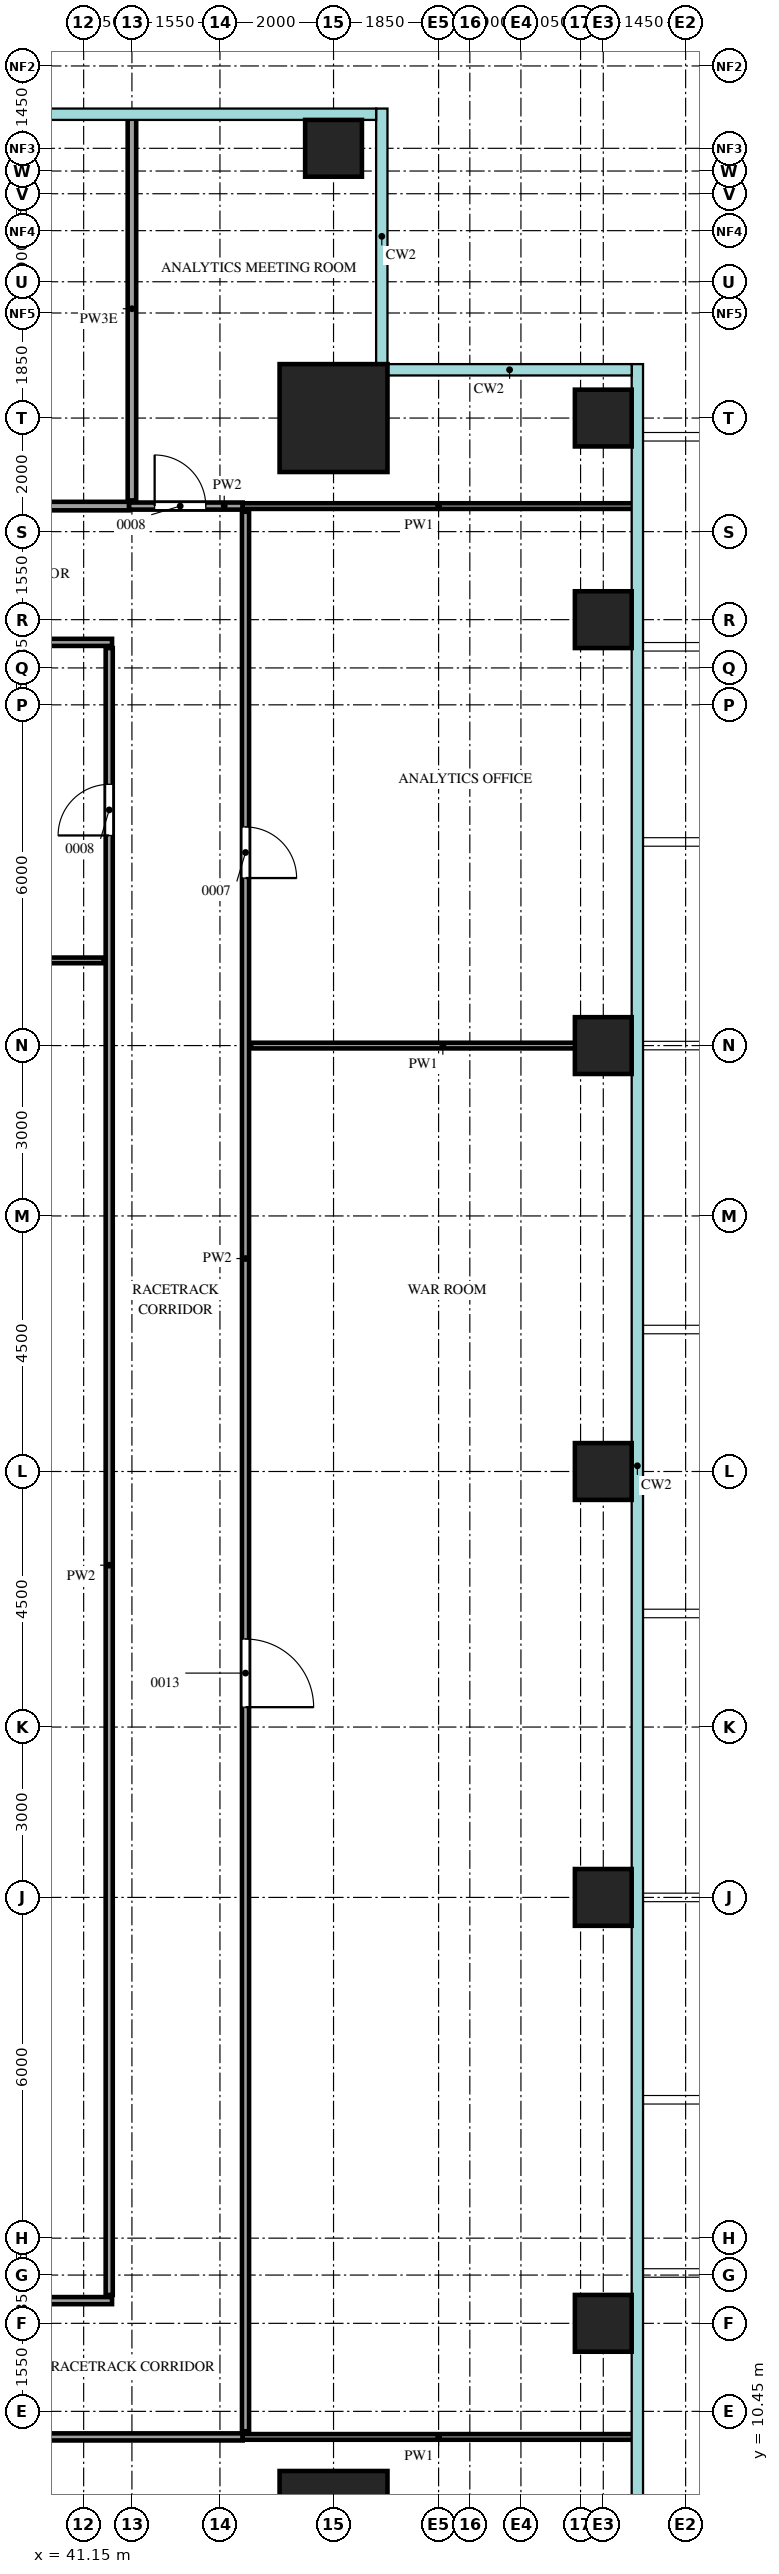
"""IFC4 building model, lengths in metres.
Left out: names, types, materials, properties, quantities, classifications, styles, units other than length and angle.
Written with IfcOpenShell. Run it as: python <this file> out.ifc"""

import sys

from ifc_helpers import new_model, si_unit, direction, frame, frame_2d, origin, origin_2d, place, context, subcontext, project, spatial, rectangle, extrude, source, transform, mapped, element, fill, save


model = new_model("IFC4")
c1 = context("Model", 3, precision=1e-05, world=origin(), true_north=direction((0.0, 1.0)))
c2 = subcontext(c1, "Body", "Model", "MODEL_VIEW")
j1 = project(units=[si_unit("LENGTHUNIT", "METRE"), si_unit("PLANEANGLEUNIT", "RADIAN")], contexts=[c1])
p1 = place(None, origin())
s1 = spatial("IfcSite", under=j1, at=p1, CompositionType="ELEMENT")
p2 = place(p1, origin())
s2 = spatial("IfcBuilding", under=s1, at=p2, CompositionType="ELEMENT")
p3 = place(p2, frame((0.0, 0.0, 208.7)))
s3 = spatial("IfcBuildingStorey", under=s2, at=p3, CompositionType="ELEMENT", Elevation=208.7)
m1 = source(origin(), c2, "Body", "SweptSolid", [
    extrude(rectangle(XDim=1.9, YDim=1.9, at=origin_2d()), origin(), (0.0, 0.0, 1.0), 4.0),
])
for number, where, z_axis, x_axis in (
    (1, (45.55, 45.55, 0.0), (0.0, 0.0, 1.0), (1.0, 0.0, 0.0)),
    (2, (45.55, 8.45, 0.0), (0.0, 0.0, 1.0), (1.0, 0.0, 0.0)),
):
    element("IfcColumn", number, at=place(p3, frame(where, z_axis=z_axis, x_axis=x_axis)), inside=s3, PredefinedType="COLUMN", context=c2, shape_type="MappedRepresentation", body=[
        mapped(m1, transform((0.0, 0.0, 0.0))),
    ])
m2 = source(origin(), c2, "Body", "SweptSolid", [
    extrude(rectangle(XDim=1.0, YDim=1.0, at=origin_2d()), origin(), (0.0, 0.0, 1.0), 3.75),
])
for number, where, z_axis, x_axis in (
    (3, (50.3, 12.0, 0.0), (0.0, 0.0, 1.0), (1.0, 0.0, 0.0)),
    (4, (50.3, 19.5, 0.0), (0.0, 0.0, 1.0), (1.0, 0.0, 0.0)),
    (5, (50.3, 27.0, 0.0), (0.0, 0.0, 1.0), (1.0, 0.0, 0.0)),
    (6, (50.3, 34.5, 0.0), (0.0, 0.0, 1.0), (1.0, 0.0, 0.0)),
    (7, (50.3, 42.0, 0.0), (0.0, 0.0, 1.0), (1.0, 0.0, 0.0)),
    (8, (50.3, 45.55, 0.0), (0.0, 0.0, 1.0), (1.0, 0.0, 0.0)),
    (9, (45.55, 50.3, 0.0), (0.0, 0.0, 1.0), (1.0, 0.0, 0.0)),
):
    element("IfcColumn", number, at=place(p3, frame(where, z_axis=z_axis, x_axis=x_axis)), inside=s3, PredefinedType="COLUMN", context=c2, shape_type="MappedRepresentation", body=[
        mapped(m2, transform((0.0, 0.0, 0.0))),
    ])
m3 = source(origin(), c2, "Body", "SweptSolid", [
    extrude(rectangle(XDim=20.6, YDim=0.125, at=frame_2d((10.3, 0.0))), origin(), (0.0, 0.0, 1.0), 3.8),
])
p4 = place(p3, frame((23.35, 10.0, 0.0), z_axis=(0.0, 0.0, 1.0), x_axis=(1.0, 0.0, 0.0)))
e10 = element("IfcWall", 10, at=p4, inside=s3, PredefinedType="PARTITIONING", context=c2, shape_type="MappedRepresentation", body=[
    mapped(m3, transform((0.0, 0.0, 0.0))),
])
m4 = source(origin(), c2, "Body", "SweptSolid", [
    extrude(rectangle(XDim=0.9, YDim=2.1, at=frame_2d((0.45, 1.05))), frame((0.0, 0.073, 0.0), z_axis=(0.0, -1.0, 0.0), x_axis=(1.0, 0.0, 0.0)), (0.0, 0.0, 1.0), 0.145),
])
p5 = place(p4, frame((1.25, 0.0, 0.0)))
e11 = element("IfcOpeningElement", 11, at=p5, cuts=e10, PredefinedType="OPENING", context=c2, shape_type="MappedRepresentation", body=[
    mapped(m4, transform((0.0, 0.0, 0.0))),
])
m5 = source(origin(), c2, "Body", "SweptSolid", [
    extrude(rectangle(XDim=1.2, YDim=2.1, at=frame_2d((0.6, 1.05))), frame((0.0, 0.073, 0.0), z_axis=(0.0, -1.0, 0.0), x_axis=(1.0, 0.0, 0.0)), (0.0, 0.0, 1.0), 0.145),
])
p6 = place(p4, frame((11.55, 0.0, 0.0)))
e12 = element("IfcOpeningElement", 12, at=p6, cuts=e10, PredefinedType="OPENING", context=c2, shape_type="MappedRepresentation", body=[
    mapped(m5, transform((0.0, 0.0, 0.0))),
])
m6 = source(origin(), c2, "Body", "SweptSolid", [
    extrude(rectangle(XDim=6.9, YDim=0.1, at=frame_2d((3.45, 0.0))), origin(), (0.0, 0.0, 1.0), 3.8),
])
p7 = place(p3, frame((43.95, 10.0, 0.0), z_axis=(0.0, 0.0, 1.0), x_axis=(1.0, 0.0, 0.0)))
e13 = element("IfcWall", 13, at=p7, inside=s3, PredefinedType="PARTITIONING", context=c2, shape_type="MappedRepresentation", body=[
    mapped(m6, transform((0.0, 0.0, 0.0))),
])
m7 = source(origin(), c2, "Body", "SweptSolid", [
    extrude(rectangle(XDim=33.8, YDim=0.125, at=frame_2d((16.9, 0.0))), origin(), (0.0, 0.0, 1.0), 3.8),
])
p8 = place(p3, frame((44.0, 10.1, 0.0), z_axis=(0.0, 0.0, 1.0), x_axis=(0.0, 1.0, 0.0)))
e14 = element("IfcWall", 14, at=p8, inside=s3, PredefinedType="PARTITIONING", context=c2, shape_type="MappedRepresentation", body=[
    mapped(m7, transform((0.0, 0.0, 0.0))),
])
p9 = place(p8, frame((12.75, 0.0, 0.0)))
e15 = element("IfcOpeningElement", 15, at=p9, cuts=e14, PredefinedType="OPENING", context=c2, shape_type="MappedRepresentation", body=[
    mapped(m5, transform((0.0, 0.0, 0.0))),
])
p10 = place(p8, frame((27.35, 0.0, 0.0)))
e16 = element("IfcOpeningElement", 16, at=p10, cuts=e14, PredefinedType="OPENING", context=c2, shape_type="MappedRepresentation", body=[
    mapped(m4, transform((0.0, 0.0, 0.0))),
])
m8 = source(origin(), c2, "Body", "SweptSolid", [
    extrude(rectangle(XDim=18.3, YDim=0.125, at=frame_2d((9.15, 0.0))), origin(), (0.0, 0.0, 1.0), 3.8),
])
p11 = place(p3, frame((23.35, 12.4, 0.0), z_axis=(0.0, 0.0, 1.0), x_axis=(1.0, 0.0, 0.0)))
e17 = element("IfcWall", 17, at=p11, inside=s3, PredefinedType="PARTITIONING", context=c2, shape_type="MappedRepresentation", body=[
    mapped(m8, transform((0.0, 0.0, 0.0))),
])
m9 = source(origin(), c2, "Body", "SweptSolid", [
    extrude(rectangle(XDim=29.0, YDim=0.125, at=frame_2d((14.5, 0.0))), origin(), (0.0, 0.0, 1.0), 3.8),
])
p12 = place(p3, frame((41.6, 12.5, 0.0), z_axis=(0.0, 0.0, 1.0), x_axis=(0.0, 1.0, 0.0)))
e18 = element("IfcWall", 18, at=p12, inside=s3, PredefinedType="PARTITIONING", context=c2, shape_type="MappedRepresentation", body=[
    mapped(m9, transform((0.0, 0.0, 0.0))),
])
p13 = place(p12, frame((25.7, 0.0, 0.0)))
e19 = element("IfcOpeningElement", 19, at=p13, cuts=e18, PredefinedType="OPENING", context=c2, shape_type="MappedRepresentation", body=[
    mapped(m4, transform((0.0, 0.0, 0.0))),
])
m10 = source(origin(), c2, "Body", "SweptSolid", [
    extrude(rectangle(XDim=6.75, YDim=0.1, at=frame_2d((3.375, 0.0))), origin(), (0.0, 0.0, 1.0), 3.8),
])
p14 = place(p3, frame((44.1, 34.5, 0.0), z_axis=(0.0, 0.0, 1.0), x_axis=(1.0, 0.0, 0.0)))
e20 = element("IfcWall", 20, at=p14, inside=s3, PredefinedType="PARTITIONING", context=c2, shape_type="MappedRepresentation", body=[
    mapped(m10, transform((0.0, 0.0, 0.0))),
])
m11 = source(origin(), c2, "Body", "SweptSolid", [
    extrude(rectangle(XDim=10.95, YDim=0.1, at=frame_2d((5.475, 0.0))), origin(), (0.0, 0.0, 1.0), 3.8),
])
p15 = place(p3, frame((30.55, 36.0, 0.0), z_axis=(0.0, 0.0, 1.0), x_axis=(1.0, 0.0, 0.0)))
e21 = element("IfcWall", 21, at=p15, inside=s3, PredefinedType="PARTITIONING", context=c2, shape_type="MappedRepresentation", body=[
    mapped(m11, transform((0.0, 0.0, 0.0))),
])
m12 = source(origin(), c2, "Body", "SweptSolid", [
    extrude(rectangle(XDim=11.1, YDim=0.125, at=frame_2d((5.55, 0.0))), origin(), (0.0, 0.0, 1.0), 3.8),
])
p16 = place(p3, frame((30.55, 41.6, 0.0), z_axis=(0.0, 0.0, 1.0), x_axis=(1.0, 0.0, 0.0)))
e22 = element("IfcWall", 22, at=p16, inside=s3, PredefinedType="PARTITIONING", context=c2, shape_type="MappedRepresentation", body=[
    mapped(m12, transform((0.0, 0.0, 0.0))),
])
m13 = source(origin(), c2, "Body", "SweptSolid", [
    extrude(rectangle(XDim=11.4, YDim=0.15, at=frame_2d((5.7, 0.0))), origin(), (0.0, 0.0, 1.0), 3.8),
])
p17 = place(p3, frame((30.55, 44.0, 0.0), z_axis=(0.0, 0.0, 1.0), x_axis=(1.0, 0.0, 0.0)))
e23 = element("IfcWall", 23, at=p17, inside=s3, PredefinedType="PARTITIONING", context=c2, shape_type="MappedRepresentation", body=[
    mapped(m13, transform((0.0, 0.0, 0.0))),
])
m14 = source(origin(), c2, "Body", "SweptSolid", [
    extrude(rectangle(XDim=0.9, YDim=2.1, at=frame_2d((0.45, 1.05))), frame((0.0, 0.085, 0.0), z_axis=(0.0, -1.0, 0.0), x_axis=(1.0, 0.0, 0.0)), (0.0, 0.0, 1.0), 0.17),
])
p18 = place(p17, frame((5.3, 0.0, 0.0)))
e24 = element("IfcOpeningElement", 24, at=p18, cuts=e23, PredefinedType="OPENING", context=c2, shape_type="MappedRepresentation", body=[
    mapped(m14, transform((0.0, 0.0, 0.0))),
])
m15 = source(origin(), c2, "Body", "SweptSolid", [
    extrude(rectangle(XDim=2.0, YDim=0.125, at=frame_2d((1.0, 0.0))), origin(), (0.0, 0.0, 1.0), 3.8),
])
p19 = place(p3, frame((41.95, 44.0, 0.0), z_axis=(0.0, 0.0, 1.0), x_axis=(1.0, 0.0, 0.0)))
e25 = element("IfcWall", 25, at=p19, inside=s3, PredefinedType="PARTITIONING", context=c2, shape_type="MappedRepresentation", body=[
    mapped(m15, transform((0.0, 0.0, 0.0))),
])
p20 = place(p19, frame((0.45, 0.0, 0.0)))
e26 = element("IfcOpeningElement", 26, at=p20, cuts=e25, PredefinedType="OPENING", context=c2, shape_type="MappedRepresentation", body=[
    mapped(m4, transform((0.0, 0.0, 0.0))),
])
p21 = place(p3, frame((43.95, 44.0, 0.0), z_axis=(0.0, 0.0, 1.0), x_axis=(1.0, 0.0, 0.0)))
e27 = element("IfcWall", 27, at=p21, inside=s3, PredefinedType="PARTITIONING", context=c2, shape_type="MappedRepresentation", body=[
    mapped(m6, transform((0.0, 0.0, 0.0))),
])
m16 = source(origin(), c2, "Body", "SweptSolid", [
    extrude(rectangle(XDim=6.75, YDim=0.15, at=frame_2d((3.375, 0.0))), origin(), (0.0, 0.0, 1.0), 3.3),
])
p22 = place(p3, frame((42.0, 44.1, 0.0), z_axis=(0.0, 0.0, 1.0), x_axis=(0.0, 1.0, 0.0)))
e28 = element("IfcWall", 28, at=p22, inside=s3, PredefinedType="PARTITIONING", context=c2, shape_type="MappedRepresentation", body=[
    mapped(m16, transform((0.0, 0.0, 0.0))),
])
m17 = source(origin(), c2, "Body", "SweptSolid", [
    extrude(rectangle(XDim=1.2, YDim=2.1, at=frame_2d((0.6, 1.05))), frame((0.0, 0.025, 0.0), z_axis=(0.0, -1.0, 0.0), x_axis=(1.0, 0.0, 0.0)), (0.0, 0.0, 1.0), 0.05),
])
p23 = place(p9, origin())
e29 = element("IfcDoor", 29, at=p23, inside=s3, OperationType="SINGLE_SWING_LEFT", PredefinedType="DOOR", context=c2, shape_type="MappedRepresentation", body=[
    mapped(m17, transform((0.0, 0.0, 0.0))),
])
fill(e15, e29)
m18 = source(origin(), c2, "Body", "SweptSolid", [
    extrude(rectangle(XDim=0.9, YDim=2.1, at=frame_2d((0.45, 1.05))), frame((0.0, 0.025, 0.0), z_axis=(0.0, -1.0, 0.0), x_axis=(1.0, 0.0, 0.0)), (0.0, 0.0, 1.0), 0.05),
])
p24 = place(p10, origin())
e30 = element("IfcDoor", 30, at=p24, inside=s3, OperationType="SINGLE_SWING_LEFT", PredefinedType="DOOR", context=c2, shape_type="MappedRepresentation", body=[
    mapped(m18, transform((0.0, 0.0, 0.0))),
])
fill(e16, e30)
p25 = place(p20, origin())
e31 = element("IfcDoor", 31, at=p25, inside=s3, OperationType="SINGLE_SWING_RIGHT", PredefinedType="DOOR", context=c2, shape_type="MappedRepresentation", body=[
    mapped(m18, transform((0.0, 0.0, 0.0))),
])
fill(e26, e31)
p26 = place(p13, origin())
e32 = element("IfcDoor", 32, at=p26, inside=s3, OperationType="SINGLE_SWING_RIGHT", PredefinedType="DOOR", context=c2, shape_type="MappedRepresentation", body=[
    mapped(m18, transform((0.0, 0.0, 0.0))),
])
fill(e19, e32)
save(model, sys.argv[1])
